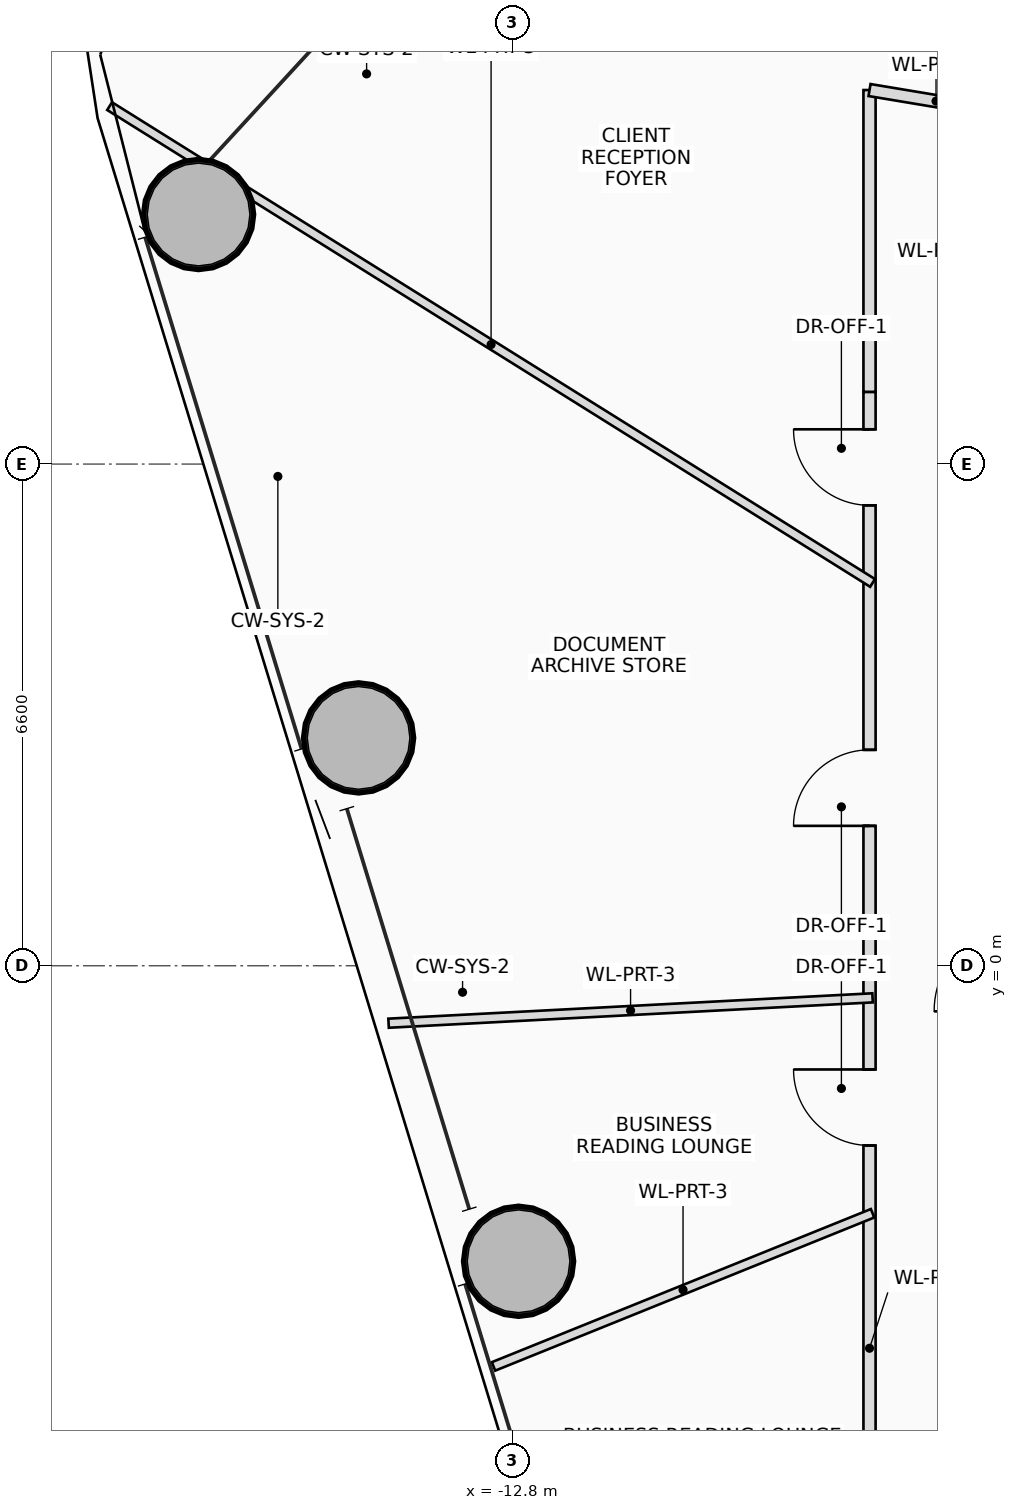
"""IFC4 building model, lengths in metres.
Left out: names, types, materials, properties, quantities, classifications, styles, units other than length and angle.
Written with IfcOpenShell. Run it as: python <this file> out.ifc"""

import sys

from ifc_helpers import new_model, si_unit, direction, frame, frame_2d, origin, origin_2d, place, context, subcontext, project, spatial, rectangle, hollow_circle, extrude, source, transform, mapped, element, fill, save


model = new_model("IFC4")
c1 = context("Model", 3, precision=1e-05, world=origin(), true_north=direction((0.0, 1.0)))
c2 = subcontext(c1, "Body", "Model", "MODEL_VIEW")
j1 = project(units=[si_unit("LENGTHUNIT", "METRE"), si_unit("PLANEANGLEUNIT", "RADIAN")], contexts=[c1])
p1 = place(None, origin())
s1 = spatial("IfcSite", under=j1, at=p1, CompositionType="ELEMENT")
p2 = place(p1, origin())
s2 = spatial("IfcBuilding", under=s1, at=p2, CompositionType="ELEMENT")
p3 = place(p2, frame((0.0, 0.0, 101.15)))
s3 = spatial("IfcBuildingStorey", under=s2, at=p3, CompositionType="ELEMENT", Elevation=101.15)
m1 = source(origin(), c2, "Body", "SweptSolid", [
    extrude(hollow_circle(Radius=0.725, WallThickness=0.05, at=origin_2d()), origin(), (0.0, 0.0, 1.0), 3.75),
])
for number, where, z_axis, x_axis in (
    (1, (-16.927, 9.883, 0.0), (0.0, 0.0, 1.0), (1.0, 0.0, 0.0)),
    (2, (-14.823, 2.998, 0.0), (0.0, 0.0, 1.0), (1.0, 0.0, 0.0)),
    (3, (-12.717, -3.888, 0.0), (0.0, 0.0, 1.0), (1.0, 0.0, 0.0)),
):
    element("IfcColumn", number, at=place(p3, frame(where, z_axis=z_axis, x_axis=x_axis)), inside=s3, PredefinedType="COLUMN", context=c2, shape_type="MappedRepresentation", body=[
        mapped(m1, transform((0.0, 0.0, 0.0), scale=1.0)),
    ])
p4 = place(p3, frame((-8.1, -7.55, 0.0), z_axis=(0.0, 0.0, 1.0), x_axis=(0.0, 1.0, 0.0)))
e4 = element("IfcWall", 4, at=p4, inside=s3, PredefinedType="PARTITIONING", context=c2, shape_type="SweptSolid", body=[
    extrude(rectangle(XDim=15.1, YDim=0.16, at=frame_2d((7.55, 0.0))), origin(), (0.0, 0.0, 1.0), 2.85),
])
p5 = place(p4, frame((5.185, 0.0, 0.0)))
e5 = element("IfcOpeningElement", 5, at=p5, cuts=e4, PredefinedType="OPENING", context=c2, shape_type="SweptSolid", body=[
    extrude(rectangle(XDim=1.0, YDim=2.25, at=frame_2d((0.5, 1.125))), frame((0.0, 0.09, 0.0), z_axis=(0.0, -1.0, 0.0), x_axis=(1.0, 0.0, 0.0)), (0.0, 0.0, 1.0), 0.18),
])
p6 = place(p4, frame((9.39, 0.0, 0.0)))
e6 = element("IfcOpeningElement", 6, at=p6, cuts=e4, PredefinedType="OPENING", context=c2, shape_type="SweptSolid", body=[
    extrude(rectangle(XDim=1.0, YDim=2.25, at=frame_2d((0.5, 1.125))), frame((0.0, 0.09, 0.0), z_axis=(0.0, -1.0, 0.0), x_axis=(1.0, 0.0, 0.0)), (0.0, 0.0, 1.0), 0.18),
])
p7 = place(p4, frame((13.607, 0.0, 0.0)))
e7 = element("IfcOpeningElement", 7, at=p7, cuts=e4, PredefinedType="OPENING", context=c2, shape_type="SweptSolid", body=[
    extrude(rectangle(XDim=1.0, YDim=2.25, at=frame_2d((0.5, 1.125))), frame((0.0, 0.09, 0.0), z_axis=(0.0, -1.0, 0.0), x_axis=(1.0, 0.0, 0.0)), (0.0, 0.0, 1.0), 0.18),
])
p8 = place(p3, frame((-8.1, 7.55, 0.0), z_axis=(0.0, 0.0, 1.0), x_axis=(0.0, 1.0, 0.0)))
e8 = element("IfcWall", 8, at=p8, inside=s3, PredefinedType="PARTITIONING", context=c2, shape_type="SweptSolid", body=[
    extrude(rectangle(XDim=3.971, YDim=0.16, at=frame_2d((1.985, 0.0))), origin(), (0.0, 0.0, 1.0), 2.85),
])
p9 = place(p3, frame((-8.1, 11.521, 0.0), z_axis=(0.0, 0.0, 1.0), x_axis=(0.986408796856, -0.164309724253, 0.0)))
e9 = element("IfcWall", 9, at=p9, inside=s3, PredefinedType="PARTITIONING", context=c2, shape_type="SweptSolid", body=[
    extrude(rectangle(XDim=1.774, YDim=0.16, at=frame_2d((0.887, 0.0))), origin(), (0.0, 0.0, 1.0), 3.545),
])
p10 = place(p3, frame((-8.06, -0.422, 0.0), z_axis=(0.0, 0.0, 1.0), x_axis=(-0.998629334036, -0.052339786045, 0.0)))
e10 = element("IfcWall", 10, at=p10, inside=s3, PredefinedType="PARTITIONING", context=c2, shape_type="SweptSolid", body=[
    extrude(rectangle(XDim=6.376, YDim=0.12, at=frame_2d((3.188, 0.0))), origin(), (0.0, 0.0, 1.0), 3.01),
])
p11 = place(p3, frame((-8.06, -3.257, 0.0), z_axis=(0.0, 0.0, 1.0), x_axis=(-0.927184543748, -0.374604887627, 0.0)))
e11 = element("IfcWall", 11, at=p11, inside=s3, PredefinedType="PARTITIONING", context=c2, shape_type="SweptSolid", body=[
    extrude(rectangle(XDim=5.379, YDim=0.12, at=frame_2d((2.689, 0.0))), origin(), (0.0, 0.0, 1.0), 2.85),
])
p12 = place(p3, frame((-8.06, 5.036, 0.0), z_axis=(0.0, 0.0, 1.0), x_axis=(-0.848040015969, 0.529932195016, 0.0)))
e12 = element("IfcWall", 12, at=p12, inside=s3, PredefinedType="PARTITIONING", context=c2, shape_type="SweptSolid", body=[
    extrude(rectangle(XDim=11.837, YDim=0.12, at=frame_2d((5.918, 0.0))), origin(), (0.0, 0.0, 1.0), 2.85),
])
p13 = place(p5, origin())
e13 = element("IfcDoor", 13, at=p13, inside=s3, OperationType="SINGLE_SWING_RIGHT", PredefinedType="DOOR", context=c2, shape_type="SweptSolid", body=[
    extrude(rectangle(XDim=1.0, YDim=2.25, at=frame_2d((0.5, 1.125))), frame((0.0, 0.025, 0.0), z_axis=(0.0, -1.0, 0.0), x_axis=(1.0, 0.0, 0.0)), (0.0, 0.0, 1.0), 0.05),
])
fill(e5, e13)
p14 = place(p6, origin())
e14 = element("IfcDoor", 14, at=p14, inside=s3, OperationType="SINGLE_SWING_LEFT", PredefinedType="DOOR", context=c2, shape_type="SweptSolid", body=[
    extrude(rectangle(XDim=1.0, YDim=2.25, at=frame_2d((0.5, 1.125))), frame((0.0, 0.025, 0.0), z_axis=(0.0, -1.0, 0.0), x_axis=(1.0, 0.0, 0.0)), (0.0, 0.0, 1.0), 0.05),
])
fill(e6, e14)
p15 = place(p7, origin())
e15 = element("IfcDoor", 15, at=p15, inside=s3, OperationType="SINGLE_SWING_RIGHT", PredefinedType="DOOR", context=c2, shape_type="SweptSolid", body=[
    extrude(rectangle(XDim=1.0, YDim=2.25, at=frame_2d((0.5, 1.125))), frame((0.0, 0.025, 0.0), z_axis=(0.0, -1.0, 0.0), x_axis=(1.0, 0.0, 0.0)), (0.0, 0.0, 1.0), 0.05),
])
fill(e7, e15)
save(model, sys.argv[1])
